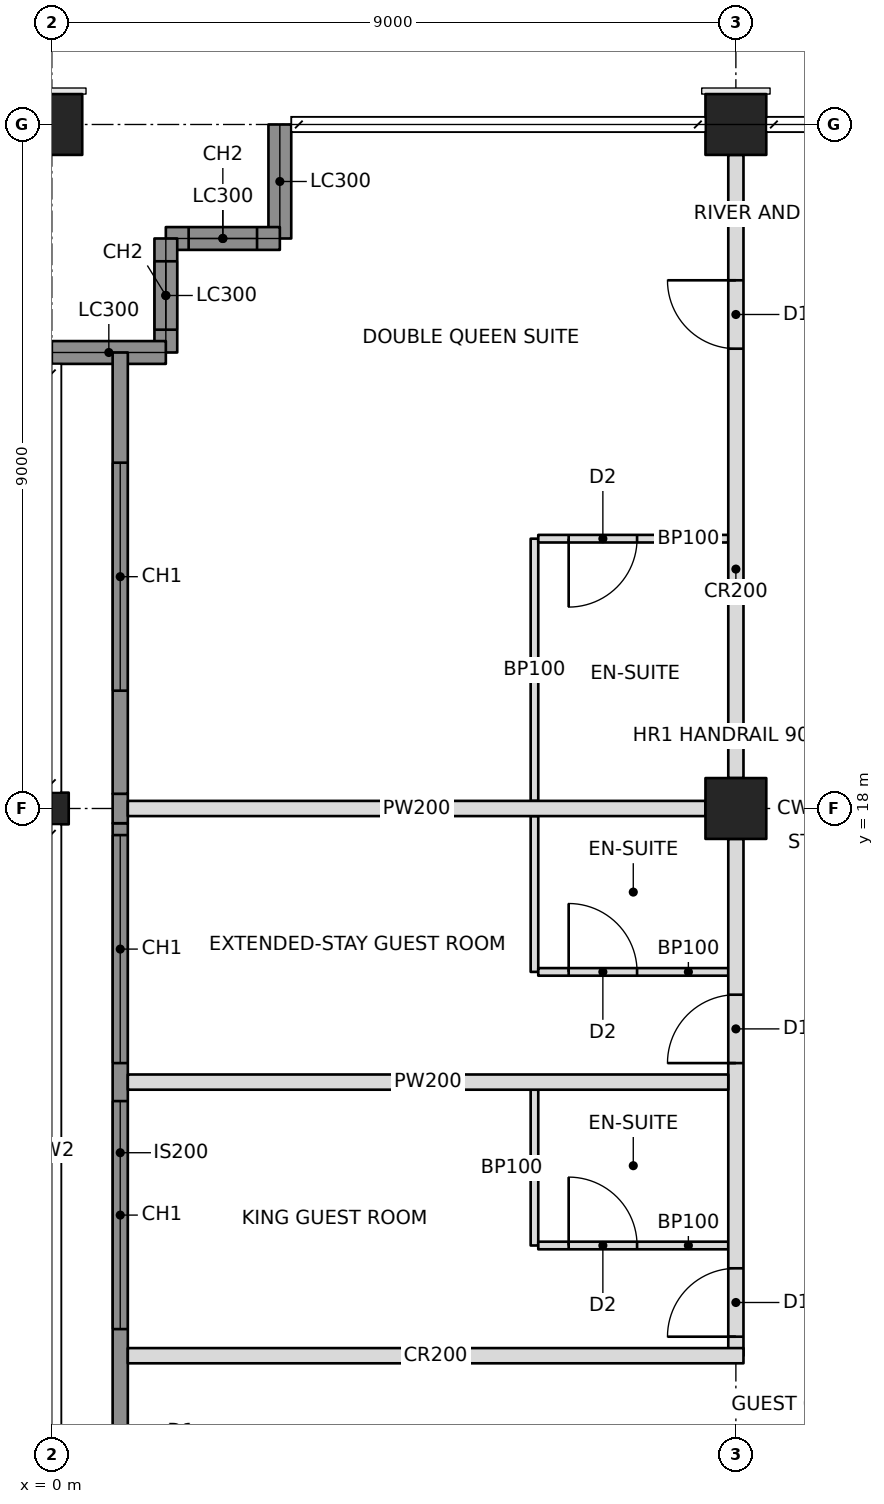
"""IFC4 building model, lengths in metres.
Left out: names, types, materials, properties, quantities, classifications, styles, units other than length and angle.
Written with IfcOpenShell. Run it as: python <this file> out.ifc"""

import sys

from ifc_helpers import new_model, si_unit, direction, frame, frame_2d, origin, origin_2d, place, context, subcontext, project, spatial, rectangle, hollow_rectangle, i_section, extrude, element, fill, save


model = new_model("IFC4")
c1 = context("Model", 3, precision=1e-05, world=origin(), true_north=direction((0.0, 1.0)))
c2 = subcontext(c1, "Body", "Model", "MODEL_VIEW")
j1 = project(units=[si_unit("LENGTHUNIT", "METRE"), si_unit("PLANEANGLEUNIT", "RADIAN")], contexts=[c1])
p1 = place(None, origin())
s1 = spatial("IfcSite", under=j1, at=p1, CompositionType="ELEMENT")
p2 = place(p1, origin())
s2 = spatial("IfcBuilding", under=s1, at=p2, CompositionType="ELEMENT")
p3 = place(p2, frame((0.0, 0.0, 251.8)))
s3 = spatial("IfcBuildingStorey", under=s2, at=p3, CompositionType="ELEMENT", Elevation=251.8)
p4 = place(p3, frame((0.0, 18.0, 0.0), z_axis=(0.0, 0.0, 1.0), x_axis=(0.0, 1.0, 0.0)))
e1 = element("IfcColumn", 1, at=p4, inside=s3, PredefinedType="COLUMN", context=c2, shape_type="SweptSolid", body=[
    extrude(i_section(OverallWidth=0.417, OverallDepth=0.445, WebThickness=0.039, FlangeThickness=0.063, at=origin_2d()), origin(), (0.0, 0.0, 1.0), 3.6),
])
for number, where, z_axis, x_axis in (
    (2, (0.0, 27.0, 0.0), (0.0, 0.0, 1.0), (0.0, 1.0, 0.0)),
    (3, (9.0, 18.0, 0.0), (0.0, 0.0, 1.0), (1.0, 0.0, 0.0)),
    (4, (9.0, 27.0, 0.0), (0.0, 0.0, 1.0), (1.0, 0.0, 0.0)),
):
    element("IfcColumn", number, at=place(p3, frame(where, z_axis=z_axis, x_axis=x_axis)), inside=s3, PredefinedType="COLUMN", context=c2, shape_type="SweptSolid", body=[
        extrude(hollow_rectangle(XDim=0.8, YDim=0.8, WallThickness=0.032, at=origin_2d()), origin(), (0.0, 0.0, 1.0), 3.6),
    ])
p5 = place(p3, frame((3.0, 27.0, 0.0), z_axis=(0.0, 0.0, 1.0), x_axis=(0.0, -1.0, 0.0)))
e5 = element("IfcWall", 5, at=p5, inside=s3, PredefinedType="SOLIDWALL", context=c2, shape_type="SweptSolid", body=[
    extrude(rectangle(XDim=1.5, YDim=0.3, at=frame_2d((0.75, 0.0))), origin(), (0.0, 0.0, 1.0), 2.62),
])
p6 = place(p3, frame((3.0, 25.5, 0.0), z_axis=(0.0, 0.0, 1.0), x_axis=(-1.0, 0.0, 0.0)))
e6 = element("IfcWall", 6, at=p6, inside=s3, PredefinedType="SOLIDWALL", context=c2, shape_type="SweptSolid", body=[
    extrude(rectangle(XDim=1.5, YDim=0.3, at=frame_2d((0.75, 0.0))), origin(), (0.0, 0.0, 1.0), 3.4),
])
p7 = place(p6, frame((0.3, 0.0, 0.6)))
e7 = element("IfcOpeningElement", 7, at=p7, cuts=e6, PredefinedType="OPENING", context=c2, shape_type="SweptSolid", body=[
    extrude(rectangle(XDim=0.9, YDim=2.2, at=frame_2d((0.45, 1.1))), frame((0.0, 0.16, 0.0), z_axis=(0.0, -1.0, 0.0), x_axis=(1.0, 0.0, 0.0)), (0.0, 0.0, 1.0), 0.32),
])
p8 = place(p3, frame((1.5, 25.5, 0.0), z_axis=(0.0, 0.0, 1.0), x_axis=(0.0, -1.0, 0.0)))
e8 = element("IfcWall", 8, at=p8, inside=s3, PredefinedType="SOLIDWALL", context=c2, shape_type="SweptSolid", body=[
    extrude(rectangle(XDim=1.5, YDim=0.3, at=frame_2d((0.75, 0.0))), origin(), (0.0, 0.0, 1.0), 3.4),
])
p9 = place(p8, frame((0.3, 0.0, 0.6)))
e9 = element("IfcOpeningElement", 9, at=p9, cuts=e8, PredefinedType="OPENING", context=c2, shape_type="SweptSolid", body=[
    extrude(rectangle(XDim=0.9, YDim=2.2, at=frame_2d((0.45, 1.1))), frame((0.0, 0.16, 0.0), z_axis=(0.0, -1.0, 0.0), x_axis=(1.0, 0.0, 0.0)), (0.0, 0.0, 1.0), 0.32),
])
p10 = place(p3, frame((1.5, 24.0, 0.0), z_axis=(0.0, 0.0, 1.0), x_axis=(-1.0, 0.0, 0.0)))
e10 = element("IfcWall", 10, at=p10, inside=s3, PredefinedType="SOLIDWALL", context=c2, shape_type="SweptSolid", body=[
    extrude(rectangle(XDim=1.5, YDim=0.3, at=frame_2d((0.75, 0.0))), origin(), (0.0, 0.0, 1.0), 2.62),
])
p11 = place(p3, frame((9.0, 10.8, 0.0), z_axis=(0.0, 0.0, 1.0), x_axis=(0.0, 1.0, 0.0)))
e11 = element("IfcWall", 11, at=p11, inside=s3, PredefinedType="PARTITIONING", context=c2, shape_type="SweptSolid", body=[
    extrude(rectangle(XDim=6.8, YDim=0.2, at=frame_2d((3.4, 0.0))), origin(), (0.0, 0.0, 1.0), 2.605),
])
p12 = place(p11, frame((0.25, 0.0, 0.0)))
e12 = element("IfcOpeningElement", 12, at=p12, cuts=e11, PredefinedType="OPENING", context=c2, shape_type="SweptSolid", body=[
    extrude(rectangle(XDim=0.9, YDim=2.1, at=frame_2d((0.45, 1.05))), frame((0.0, 0.11, 0.0), z_axis=(0.0, -1.0, 0.0), x_axis=(1.0, 0.0, 0.0)), (0.0, 0.0, 1.0), 0.22),
])
p13 = place(p11, frame((3.85, 0.0, 0.0)))
e13 = element("IfcOpeningElement", 13, at=p13, cuts=e11, PredefinedType="OPENING", context=c2, shape_type="SweptSolid", body=[
    extrude(rectangle(XDim=0.9, YDim=2.1, at=frame_2d((0.45, 1.05))), frame((0.0, 0.11, 0.0), z_axis=(0.0, -1.0, 0.0), x_axis=(1.0, 0.0, 0.0)), (0.0, 0.0, 1.0), 0.22),
])
p14 = place(p3, frame((9.0, 18.4, 0.0), z_axis=(0.0, 0.0, 1.0), x_axis=(0.0, 1.0, 0.0)))
e14 = element("IfcWall", 14, at=p14, inside=s3, PredefinedType="PARTITIONING", context=c2, shape_type="SweptSolid", body=[
    extrude(rectangle(XDim=8.2, YDim=0.2, at=frame_2d((4.1, 0.0))), origin(), (0.0, 0.0, 1.0), 2.605),
])
p15 = place(p14, frame((5.65, 0.0, 0.0)))
e15 = element("IfcOpeningElement", 15, at=p15, cuts=e14, PredefinedType="OPENING", context=c2, shape_type="SweptSolid", body=[
    extrude(rectangle(XDim=0.9, YDim=2.1, at=frame_2d((0.45, 1.05))), frame((0.0, 0.11, 0.0), z_axis=(0.0, -1.0, 0.0), x_axis=(1.0, 0.0, 0.0)), (0.0, 0.0, 1.0), 0.22),
])
p16 = place(p3, frame((1.0, 10.8, 0.0), z_axis=(0.0, 0.0, 1.0), x_axis=(1.0, 0.0, 0.0)))
e16 = element("IfcWall", 16, at=p16, inside=s3, PredefinedType="PARTITIONING", context=c2, shape_type="SweptSolid", body=[
    extrude(rectangle(XDim=8.1, YDim=0.2, at=frame_2d((4.05, 0.0))), origin(), (0.0, 0.0, 1.0), 2.604),
])
p17 = place(p3, frame((8.9, 14.4, 0.0), z_axis=(0.0, 0.0, 1.0), x_axis=(-1.0, 0.0, 0.0)))
e17 = element("IfcWall", 17, at=p17, inside=s3, PredefinedType="PARTITIONING", context=c2, shape_type="SweptSolid", body=[
    extrude(rectangle(XDim=7.9, YDim=0.2, at=frame_2d((3.95, 0.0))), origin(), (0.0, 0.0, 1.0), 2.604),
])
p18 = place(p3, frame((8.6, 18.0, 0.0), z_axis=(0.0, 0.0, 1.0), x_axis=(-1.0, 0.0, 0.0)))
e18 = element("IfcWall", 18, at=p18, inside=s3, PredefinedType="PARTITIONING", context=c2, shape_type="SweptSolid", body=[
    extrude(rectangle(XDim=7.6, YDim=0.2, at=frame_2d((3.8, 0.0))), origin(), (0.0, 0.0, 1.0), 2.605),
])
p19 = place(p3, frame((6.35, 12.25, 0.0), z_axis=(0.0, 0.0, 1.0), x_axis=(0.0, 1.0, 0.0)))
e19 = element("IfcWall", 19, at=p19, inside=s3, PredefinedType="PARTITIONING", context=c2, shape_type="SweptSolid", body=[
    extrude(rectangle(XDim=2.05, YDim=0.1, at=frame_2d((1.025, 0.0))), origin(), (0.0, 0.0, 1.0), 3.4),
])
p20 = place(p3, frame((8.9, 12.25, 0.0), z_axis=(0.0, 0.0, 1.0), x_axis=(-1.0, 0.0, 0.0)))
e20 = element("IfcWall", 20, at=p20, inside=s3, PredefinedType="PARTITIONING", context=c2, shape_type="SweptSolid", body=[
    extrude(rectangle(XDim=2.5, YDim=0.1, at=frame_2d((1.25, 0.0))), origin(), (0.0, 0.0, 1.0), 2.604),
])
p21 = place(p20, frame((1.2, 0.0, 0.0)))
e21 = element("IfcOpeningElement", 21, at=p21, cuts=e20, PredefinedType="OPENING", context=c2, shape_type="SweptSolid", body=[
    extrude(rectangle(XDim=0.9, YDim=2.1, at=frame_2d((0.45, 1.05))), frame((0.0, 0.06, 0.0), z_axis=(0.0, -1.0, 0.0), x_axis=(1.0, 0.0, 0.0)), (0.0, 0.0, 1.0), 0.12),
])
p22 = place(p3, frame((6.35, 15.85, 0.0), z_axis=(0.0, 0.0, 1.0), x_axis=(0.0, 1.0, 0.0)))
e22 = element("IfcWall", 22, at=p22, inside=s3, PredefinedType="PARTITIONING", context=c2, shape_type="SweptSolid", body=[
    extrude(rectangle(XDim=2.05, YDim=0.1, at=frame_2d((1.025, 0.0))), origin(), (0.0, 0.0, 1.0), 2.604),
])
p23 = place(p3, frame((8.9, 15.85, 0.0), z_axis=(0.0, 0.0, 1.0), x_axis=(-1.0, 0.0, 0.0)))
e23 = element("IfcWall", 23, at=p23, inside=s3, PredefinedType="PARTITIONING", context=c2, shape_type="SweptSolid", body=[
    extrude(rectangle(XDim=2.5, YDim=0.1, at=frame_2d((1.25, 0.0))), origin(), (0.0, 0.0, 1.0), 2.604),
])
p24 = place(p23, frame((1.2, 0.0, 0.0)))
e24 = element("IfcOpeningElement", 24, at=p24, cuts=e23, PredefinedType="OPENING", context=c2, shape_type="SweptSolid", body=[
    extrude(rectangle(XDim=0.9, YDim=2.1, at=frame_2d((0.45, 1.05))), frame((0.0, 0.06, 0.0), z_axis=(0.0, -1.0, 0.0), x_axis=(1.0, 0.0, 0.0)), (0.0, 0.0, 1.0), 0.12),
])
p25 = place(p3, frame((6.35, 18.1, 0.0), z_axis=(0.0, 0.0, 1.0), x_axis=(0.0, 1.0, 0.0)))
e25 = element("IfcWall", 25, at=p25, inside=s3, PredefinedType="PARTITIONING", context=c2, shape_type="SweptSolid", body=[
    extrude(rectangle(XDim=3.45, YDim=0.1, at=frame_2d((1.725, 0.0))), origin(), (0.0, 0.0, 1.0), 2.604),
])
p26 = place(p3, frame((8.9, 21.55, 0.0), z_axis=(0.0, 0.0, 1.0), x_axis=(-1.0, 0.0, 0.0)))
e26 = element("IfcWall", 26, at=p26, inside=s3, PredefinedType="PARTITIONING", context=c2, shape_type="SweptSolid", body=[
    extrude(rectangle(XDim=2.5, YDim=0.1, at=frame_2d((1.25, 0.0))), origin(), (0.0, 0.0, 1.0), 2.604),
])
p27 = place(p26, frame((1.2, 0.0, 0.0)))
e27 = element("IfcOpeningElement", 27, at=p27, cuts=e26, PredefinedType="OPENING", context=c2, shape_type="SweptSolid", body=[
    extrude(rectangle(XDim=0.9, YDim=2.1, at=frame_2d((0.45, 1.05))), frame((0.0, 0.06, 0.0), z_axis=(0.0, -1.0, 0.0), x_axis=(1.0, 0.0, 0.0)), (0.0, 0.0, 1.0), 0.12),
])
p28 = place(p3, frame((0.9, 9.135, 0.0), z_axis=(0.0, 0.0, 1.0), x_axis=(0.0, 1.0, 0.0)))
e28 = element("IfcWall", 28, at=p28, inside=s3, PredefinedType="SOLIDWALL", context=c2, shape_type="SweptSolid", body=[
    extrude(rectangle(XDim=8.671, YDim=0.2, at=frame_2d((4.335, 0.0))), origin(), (0.0, 0.0, 1.0), 3.4),
])
p29 = place(p28, frame((2.015, 0.0, 0.6)))
e29 = element("IfcOpeningElement", 29, at=p29, cuts=e28, PredefinedType="OPENING", context=c2, shape_type="SweptSolid", body=[
    extrude(rectangle(XDim=3.0, YDim=2.2, at=frame_2d((1.5, 1.1))), frame((0.0, 0.11, 0.0), z_axis=(0.0, -1.0, 0.0), x_axis=(1.0, 0.0, 0.0)), (0.0, 0.0, 1.0), 0.22),
])
p30 = place(p28, frame((5.515, 0.0, 0.6)))
e30 = element("IfcOpeningElement", 30, at=p30, cuts=e28, PredefinedType="OPENING", context=c2, shape_type="SweptSolid", body=[
    extrude(rectangle(XDim=3.0, YDim=2.2, at=frame_2d((1.5, 1.1))), frame((0.0, 0.11, 0.0), z_axis=(0.0, -1.0, 0.0), x_axis=(1.0, 0.0, 0.0)), (0.0, 0.0, 1.0), 0.22),
])
p31 = place(p3, frame((0.9, 17.806, 0.0), z_axis=(0.0, 0.0, 1.0), x_axis=(0.0, 1.0, 0.0)))
e31 = element("IfcWall", 31, at=p31, inside=s3, PredefinedType="SOLIDWALL", context=c2, shape_type="SweptSolid", body=[
    extrude(rectangle(XDim=0.388, YDim=0.2, at=frame_2d((0.194, 0.0))), origin(), (0.0, 0.0, 1.0), 2.604),
])
p32 = place(p3, frame((0.9, 18.194, 0.0), z_axis=(0.0, 0.0, 1.0), x_axis=(0.0, 1.0, 0.0)))
e32 = element("IfcWall", 32, at=p32, inside=s3, PredefinedType="SOLIDWALL", context=c2, shape_type="SweptSolid", body=[
    extrude(rectangle(XDim=5.806, YDim=0.2, at=frame_2d((2.903, 0.0))), origin(), (0.0, 0.0, 1.0), 3.4),
])
p33 = place(p32, frame((1.356, 0.0, 0.6)))
e33 = element("IfcOpeningElement", 33, at=p33, cuts=e32, PredefinedType="OPENING", context=c2, shape_type="SweptSolid", body=[
    extrude(rectangle(XDim=3.0, YDim=2.2, at=frame_2d((1.5, 1.1))), frame((0.0, 0.11, 0.0), z_axis=(0.0, -1.0, 0.0), x_axis=(1.0, 0.0, 0.0)), (0.0, 0.0, 1.0), 0.22),
])
p34 = place(p7, origin())
e34 = element("IfcWindow", 34, at=p34, inside=s3, PartitioningType="SINGLE_PANEL", PredefinedType="WINDOW", context=c2, shape_type="SweptSolid", body=[
    extrude(rectangle(XDim=0.9, YDim=2.2, at=frame_2d((0.45, 1.1))), frame((0.0, 0.03, 0.0), z_axis=(0.0, -1.0, 0.0), x_axis=(1.0, 0.0, 0.0)), (0.0, 0.0, 1.0), 0.06),
])
fill(e7, e34)
p35 = place(p9, origin())
e35 = element("IfcWindow", 35, at=p35, inside=s3, PartitioningType="SINGLE_PANEL", PredefinedType="WINDOW", context=c2, shape_type="SweptSolid", body=[
    extrude(rectangle(XDim=0.9, YDim=2.2, at=frame_2d((0.45, 1.1))), frame((0.0, 0.03, 0.0), z_axis=(0.0, -1.0, 0.0), x_axis=(1.0, 0.0, 0.0)), (0.0, 0.0, 1.0), 0.06),
])
fill(e9, e35)
p36 = place(p29, origin())
e36 = element("IfcWindow", 36, at=p36, inside=s3, PartitioningType="TRIPLE_PANEL_VERTICAL", PredefinedType="WINDOW", context=c2, shape_type="SweptSolid", body=[
    extrude(rectangle(XDim=3.0, YDim=2.2, at=frame_2d((1.5, 1.1))), frame((0.0, 0.03, 0.0), z_axis=(0.0, -1.0, 0.0), x_axis=(1.0, 0.0, 0.0)), (0.0, 0.0, 1.0), 0.06),
])
fill(e29, e36)
p37 = place(p30, origin())
e37 = element("IfcWindow", 37, at=p37, inside=s3, PartitioningType="TRIPLE_PANEL_VERTICAL", PredefinedType="WINDOW", context=c2, shape_type="SweptSolid", body=[
    extrude(rectangle(XDim=3.0, YDim=2.2, at=frame_2d((1.5, 1.1))), frame((0.0, 0.03, 0.0), z_axis=(0.0, -1.0, 0.0), x_axis=(1.0, 0.0, 0.0)), (0.0, 0.0, 1.0), 0.06),
])
fill(e30, e37)
p38 = place(p33, origin())
e38 = element("IfcWindow", 38, at=p38, inside=s3, PartitioningType="TRIPLE_PANEL_VERTICAL", PredefinedType="WINDOW", context=c2, shape_type="SweptSolid", body=[
    extrude(rectangle(XDim=3.0, YDim=2.2, at=frame_2d((1.5, 1.1))), frame((0.0, 0.03, 0.0), z_axis=(0.0, -1.0, 0.0), x_axis=(1.0, 0.0, 0.0)), (0.0, 0.0, 1.0), 0.06),
])
fill(e33, e38)
p39 = place(p21, frame((0.9, 0.0, 0.0), z_axis=(0.0, 0.0, 1.0), x_axis=(-1.0, 0.0, 0.0)))
e39 = element("IfcDoor", 39, at=p39, inside=s3, OperationType="SINGLE_SWING_LEFT", PredefinedType="DOOR", context=c2, shape_type="SweptSolid", body=[
    extrude(rectangle(XDim=0.9, YDim=2.1, at=frame_2d((0.45, 1.05))), frame((0.0, 0.025, 0.0), z_axis=(0.0, -1.0, 0.0), x_axis=(1.0, 0.0, 0.0)), (0.0, 0.0, 1.0), 0.05),
])
fill(e21, e39)
p40 = place(p12, origin())
e40 = element("IfcDoor", 40, at=p40, inside=s3, OperationType="SINGLE_SWING_LEFT", PredefinedType="DOOR", context=c2, shape_type="SweptSolid", body=[
    extrude(rectangle(XDim=0.9, YDim=2.1, at=frame_2d((0.45, 1.05))), frame((0.0, 0.025, 0.0), z_axis=(0.0, -1.0, 0.0), x_axis=(1.0, 0.0, 0.0)), (0.0, 0.0, 1.0), 0.05),
])
fill(e12, e40)
p41 = place(p24, frame((0.9, 0.0, 0.0), z_axis=(0.0, 0.0, 1.0), x_axis=(-1.0, 0.0, 0.0)))
e41 = element("IfcDoor", 41, at=p41, inside=s3, OperationType="SINGLE_SWING_LEFT", PredefinedType="DOOR", context=c2, shape_type="SweptSolid", body=[
    extrude(rectangle(XDim=0.9, YDim=2.1, at=frame_2d((0.45, 1.05))), frame((0.0, 0.025, 0.0), z_axis=(0.0, -1.0, 0.0), x_axis=(1.0, 0.0, 0.0)), (0.0, 0.0, 1.0), 0.05),
])
fill(e24, e41)
p42 = place(p13, origin())
e42 = element("IfcDoor", 42, at=p42, inside=s3, OperationType="SINGLE_SWING_LEFT", PredefinedType="DOOR", context=c2, shape_type="SweptSolid", body=[
    extrude(rectangle(XDim=0.9, YDim=2.1, at=frame_2d((0.45, 1.05))), frame((0.0, 0.025, 0.0), z_axis=(0.0, -1.0, 0.0), x_axis=(1.0, 0.0, 0.0)), (0.0, 0.0, 1.0), 0.05),
])
fill(e13, e42)
p43 = place(p27, origin())
e43 = element("IfcDoor", 43, at=p43, inside=s3, OperationType="SINGLE_SWING_RIGHT", PredefinedType="DOOR", context=c2, shape_type="SweptSolid", body=[
    extrude(rectangle(XDim=0.9, YDim=2.1, at=frame_2d((0.45, 1.05))), frame((0.0, 0.025, 0.0), z_axis=(0.0, -1.0, 0.0), x_axis=(1.0, 0.0, 0.0)), (0.0, 0.0, 1.0), 0.05),
])
fill(e27, e43)
p44 = place(p15, origin())
e44 = element("IfcDoor", 44, at=p44, inside=s3, OperationType="SINGLE_SWING_RIGHT", PredefinedType="DOOR", context=c2, shape_type="SweptSolid", body=[
    extrude(rectangle(XDim=0.9, YDim=2.1, at=frame_2d((0.45, 1.05))), frame((0.0, 0.025, 0.0), z_axis=(0.0, -1.0, 0.0), x_axis=(1.0, 0.0, 0.0)), (0.0, 0.0, 1.0), 0.05),
])
fill(e15, e44)
save(model, sys.argv[1])
